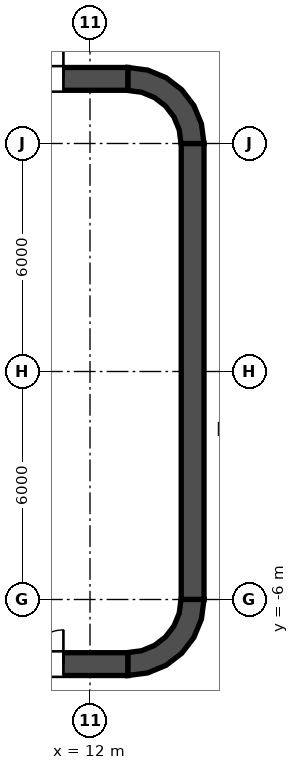
"""IFC4 building model, lengths in metres.
Left out: names, types, materials, properties, quantities, classifications, styles, units other than length and angle.
Written with IfcOpenShell. Run it as: python <this file> out.ifc"""

import sys

from ifc_helpers import new_model, si_unit, direction, frame, frame_2d, origin, place, context, subcontext, project, spatial, polyline, rectangle, outline, extrude, element, fill, save


model = new_model("IFC4")
c1 = context("Model", 3, precision=1e-05, world=origin(), true_north=direction((0.0, 1.0)))
c2 = subcontext(c1, "Body", "Model", "MODEL_VIEW")
j1 = project(units=[si_unit("LENGTHUNIT", "METRE"), si_unit("PLANEANGLEUNIT", "RADIAN")], contexts=[c1])
p1 = place(None, origin())
s1 = spatial("IfcSite", under=j1, at=p1, CompositionType="ELEMENT")
p2 = place(p1, origin())
s2 = spatial("IfcBuilding", under=s1, at=p2, CompositionType="ELEMENT")
p3 = place(p2, frame((0.0, 0.0, 37.4)))
s3 = spatial("IfcBuildingStorey", under=s2, at=p3, CompositionType="ELEMENT", Elevation=37.4)
p4 = place(p3, frame((-13.0, 7.7, 0.0), z_axis=(0.0, 0.0, 1.0), x_axis=(1.0, 0.0, 0.0)))
e1 = element("IfcWall", 1, at=p4, inside=s3, PredefinedType="SHEAR", context=c2, shape_type="SweptSolid", body=[
    extrude(rectangle(XDim=26.0, YDim=0.6, at=frame_2d((13.0, 0.0))), origin(), (0.0, 0.0, 1.0), 6.6),
])
p5 = place(p4, frame((1.7, 0.0, 0.0)))
e2 = element("IfcOpeningElement", 2, at=p5, cuts=e1, PredefinedType="OPENING", context=c2, shape_type="SweptSolid", body=[
    extrude(rectangle(XDim=1.8, YDim=2.1, at=frame_2d((0.9, 1.05))), frame((0.0, 0.3, 0.0), z_axis=(0.0, -1.0, 0.0), x_axis=(1.0, 0.0, 0.0)), (0.0, 0.0, 1.0), 0.6),
])
p6 = place(p4, frame((22.5, 0.0, 0.0)))
e3 = element("IfcOpeningElement", 3, at=p6, cuts=e1, PredefinedType="OPENING", context=c2, shape_type="SweptSolid", body=[
    extrude(rectangle(XDim=1.8, YDim=2.1, at=frame_2d((0.9, 1.05))), frame((0.0, 0.3, 0.0), z_axis=(0.0, -1.0, 0.0), x_axis=(1.0, 0.0, 0.0)), (0.0, 0.0, 1.0), 0.6),
])
p7 = place(p3, frame((-13.0, -7.7, 0.0), z_axis=(0.0, 0.0, 1.0), x_axis=(1.0, 0.0, 0.0)))
e4 = element("IfcWall", 4, at=p7, inside=s3, PredefinedType="SHEAR", context=c2, shape_type="SweptSolid", body=[
    extrude(rectangle(XDim=26.0, YDim=0.6, at=frame_2d((13.0, 0.0))), origin(), (0.0, 0.0, 1.0), 6.6),
])
p8 = place(p7, frame((1.7, 0.0, 0.0)))
e5 = element("IfcOpeningElement", 5, at=p8, cuts=e4, PredefinedType="OPENING", context=c2, shape_type="SweptSolid", body=[
    extrude(rectangle(XDim=1.8, YDim=2.1, at=frame_2d((0.9, 1.05))), frame((0.0, 0.3, 0.0), z_axis=(0.0, -1.0, 0.0), x_axis=(1.0, 0.0, 0.0)), (0.0, 0.0, 1.0), 0.6),
])
p9 = place(p7, frame((22.5, 0.0, 0.0)))
e6 = element("IfcOpeningElement", 6, at=p9, cuts=e4, PredefinedType="OPENING", context=c2, shape_type="SweptSolid", body=[
    extrude(rectangle(XDim=1.8, YDim=2.1, at=frame_2d((0.9, 1.05))), frame((0.0, 0.3, 0.0), z_axis=(0.0, -1.0, 0.0), x_axis=(1.0, 0.0, 0.0)), (0.0, 0.0, 1.0), 0.6),
])
p10 = place(p3, frame((14.7, -6.0, 0.0), z_axis=(0.0, 0.0, 1.0), x_axis=(0.0, 1.0, 0.0)))
e7 = element("IfcWall", 7, at=p10, inside=s3, PredefinedType="SHEAR", context=c2, shape_type="SweptSolid", body=[
    extrude(rectangle(XDim=12.0, YDim=0.6, at=frame_2d((6.0, 0.0))), origin(), (0.0, 0.0, 1.0), 6.6),
])
p11 = place(p3, origin())
e8 = element("IfcWall", 8, at=p11, inside=s3, PredefinedType="SHEAR", context=c2, shape_type="SweptSolid", body=[
    extrude(outline(polyline([(13.0, 8.0), (13.0, 7.395), (13.361, 7.347), (13.698, 7.208), (13.986, 6.986), (14.208, 6.698), (14.347, 6.361), (14.395, 6.0), (15.0, 6.0), (14.932, 6.518), (14.732, 7.0), (14.414, 7.414), (14.0, 7.732), (13.518, 7.932), (13.0, 8.0)])), origin(), (0.0, 0.0, 1.0), 6.6),
])
e9 = element("IfcWall", 9, at=p11, inside=s3, PredefinedType="SHEAR", context=c2, shape_type="SweptSolid", body=[
    extrude(outline(polyline([(15.0, -6.0), (14.395, -6.0), (14.347, -6.361), (14.208, -6.698), (13.986, -6.986), (13.698, -7.208), (13.361, -7.347), (13.0, -7.395), (13.0, -8.0), (13.518, -7.932), (14.0, -7.732), (14.414, -7.414), (14.732, -7.0), (14.932, -6.518), (15.0, -6.0)])), origin(), (0.0, 0.0, 1.0), 6.6),
])
p12 = place(p3, frame((11.8, -7.4, 0.0), z_axis=(0.0, 0.0, 1.0), x_axis=(0.0, 1.0, 0.0)))
e10 = element("IfcWall", 10, at=p12, inside=s3, PredefinedType="SOLIDWALL", context=c2, shape_type="SweptSolid", body=[
    extrude(rectangle(XDim=14.8, YDim=0.4, at=frame_2d((7.4, 0.0))), origin(), (0.0, 0.0, 1.0), 6.25),
])
p13 = place(p12, frame((11.2, 0.0, 0.0)))
e11 = element("IfcOpeningElement", 11, at=p13, cuts=e10, PredefinedType="OPENING", context=c2, shape_type="SweptSolid", body=[
    extrude(rectangle(XDim=1.1, YDim=2.1, at=frame_2d((0.55, 1.05))), frame((0.0, 0.2, 0.0), z_axis=(0.0, -1.0, 0.0), x_axis=(1.0, 0.0, 0.0)), (0.0, 0.0, 1.0), 0.4),
])
p14 = place(p12, frame((8.3, 0.0, 0.0)))
e12 = element("IfcOpeningElement", 12, at=p14, cuts=e10, PredefinedType="OPENING", context=c2, shape_type="SweptSolid", body=[
    extrude(rectangle(XDim=1.1, YDim=2.1, at=frame_2d((0.55, 1.05))), frame((0.0, 0.2, 0.0), z_axis=(0.0, -1.0, 0.0), x_axis=(1.0, 0.0, 0.0)), (0.0, 0.0, 1.0), 0.4),
])
p15 = place(p12, frame((5.4, 0.0, 0.0)))
e13 = element("IfcOpeningElement", 13, at=p15, cuts=e10, PredefinedType="OPENING", context=c2, shape_type="SweptSolid", body=[
    extrude(rectangle(XDim=1.1, YDim=2.1, at=frame_2d((0.55, 1.05))), frame((0.0, 0.2, 0.0), z_axis=(0.0, -1.0, 0.0), x_axis=(1.0, 0.0, 0.0)), (0.0, 0.0, 1.0), 0.4),
])
p16 = place(p12, frame((13.552, 0.0, 0.0)))
e14 = element("IfcOpeningElement", 14, at=p16, cuts=e10, PredefinedType="OPENING", context=c2, shape_type="SweptSolid", body=[
    extrude(rectangle(XDim=0.9, YDim=2.1, at=frame_2d((0.45, 1.05))), frame((0.0, 0.2, 0.0), z_axis=(0.0, -1.0, 0.0), x_axis=(1.0, 0.0, 0.0)), (0.0, 0.0, 1.0), 0.4),
])
p17 = place(p12, frame((0.347, 0.0, 0.0)))
e15 = element("IfcOpeningElement", 15, at=p17, cuts=e10, PredefinedType="OPENING", context=c2, shape_type="SweptSolid", body=[
    extrude(rectangle(XDim=0.9, YDim=2.1, at=frame_2d((0.45, 1.05))), frame((0.0, 0.2, 0.0), z_axis=(0.0, -1.0, 0.0), x_axis=(1.0, 0.0, 0.0)), (0.0, 0.0, 1.0), 0.4),
])
e16 = element("IfcWall", 16, at=p11, inside=s3, PredefinedType="SOLIDWALL", context=c2, shape_type="SweptSolid", body=[
    extrude(outline(polyline([(12.0, -5.675), (12.0, -5.925), (14.15, -5.925), (14.4, -5.925), (14.4, -5.675), (14.4, -3.025), (14.4, -2.775), (14.4, -0.125), (14.4, 0.125), (14.4, 2.775), (14.4, 3.025), (14.4, 5.675), (14.4, 5.925), (14.15, 5.925), (12.0, 5.925), (12.0, 5.675), (14.15, 5.675), (14.15, 3.025), (12.0, 3.025), (12.0, 2.775), (14.15, 2.775), (14.15, 0.125), (12.0, 0.125), (12.0, -0.125), (14.15, -0.125), (14.15, -2.775), (12.0, -2.775), (12.0, -3.025), (14.15, -3.025), (14.15, -5.675), (12.0, -5.675)])), origin(), (0.0, 0.0, 1.0), 6.25),
])
p18 = place(p13, origin())
e17 = element("IfcDoor", 17, at=p18, inside=s3, OperationType="DOUBLE_DOOR_SLIDING", PredefinedType="DOOR", context=c2, shape_type="SweptSolid", body=[
    extrude(rectangle(XDim=1.1, YDim=2.1, at=frame_2d((0.55, 1.05))), frame((0.0, 0.025, 0.0), z_axis=(0.0, -1.0, 0.0), x_axis=(1.0, 0.0, 0.0)), (0.0, 0.0, 1.0), 0.05),
])
fill(e11, e17)
p19 = place(p14, origin())
e18 = element("IfcDoor", 18, at=p19, inside=s3, OperationType="DOUBLE_DOOR_SLIDING", PredefinedType="DOOR", context=c2, shape_type="SweptSolid", body=[
    extrude(rectangle(XDim=1.1, YDim=2.1, at=frame_2d((0.55, 1.05))), frame((0.0, 0.025, 0.0), z_axis=(0.0, -1.0, 0.0), x_axis=(1.0, 0.0, 0.0)), (0.0, 0.0, 1.0), 0.05),
])
fill(e12, e18)
p20 = place(p15, origin())
e19 = element("IfcDoor", 19, at=p20, inside=s3, OperationType="DOUBLE_DOOR_SLIDING", PredefinedType="DOOR", context=c2, shape_type="SweptSolid", body=[
    extrude(rectangle(XDim=1.1, YDim=2.1, at=frame_2d((0.55, 1.05))), frame((0.0, 0.025, 0.0), z_axis=(0.0, -1.0, 0.0), x_axis=(1.0, 0.0, 0.0)), (0.0, 0.0, 1.0), 0.05),
])
fill(e13, e19)
p21 = place(p16, origin())
e20 = element("IfcDoor", 20, at=p21, inside=s3, OperationType="SINGLE_SWING_RIGHT", PredefinedType="DOOR", context=c2, shape_type="SweptSolid", body=[
    extrude(rectangle(XDim=0.9, YDim=2.1, at=frame_2d((0.45, 1.05))), frame((0.0, 0.025, 0.0), z_axis=(0.0, -1.0, 0.0), x_axis=(1.0, 0.0, 0.0)), (0.0, 0.0, 1.0), 0.05),
])
fill(e14, e20)
p22 = place(p17, origin())
e21 = element("IfcDoor", 21, at=p22, inside=s3, OperationType="SINGLE_SWING_RIGHT", PredefinedType="DOOR", context=c2, shape_type="SweptSolid", body=[
    extrude(rectangle(XDim=0.9, YDim=2.1, at=frame_2d((0.45, 1.05))), frame((0.0, 0.025, 0.0), z_axis=(0.0, -1.0, 0.0), x_axis=(1.0, 0.0, 0.0)), (0.0, 0.0, 1.0), 0.05),
])
fill(e15, e21)
p23 = place(p6, origin())
e22 = element("IfcDoor", 22, at=p23, inside=s3, OperationType="DOUBLE_DOOR_SINGLE_SWING", PredefinedType="DOOR", context=c2, shape_type="SweptSolid", body=[
    extrude(rectangle(XDim=1.8, YDim=2.1, at=frame_2d((0.9, 1.05))), frame((0.0, 0.025, 0.0), z_axis=(0.0, -1.0, 0.0), x_axis=(1.0, 0.0, 0.0)), (0.0, 0.0, 1.0), 0.05),
])
fill(e3, e22)
p24 = place(p9, origin())
e23 = element("IfcDoor", 23, at=p24, inside=s3, OperationType="DOUBLE_DOOR_SINGLE_SWING", PredefinedType="DOOR", context=c2, shape_type="SweptSolid", body=[
    extrude(rectangle(XDim=1.8, YDim=2.1, at=frame_2d((0.9, 1.05))), frame((0.0, 0.025, 0.0), z_axis=(0.0, -1.0, 0.0), x_axis=(1.0, 0.0, 0.0)), (0.0, 0.0, 1.0), 0.05),
])
fill(e6, e23)
save(model, sys.argv[1])
